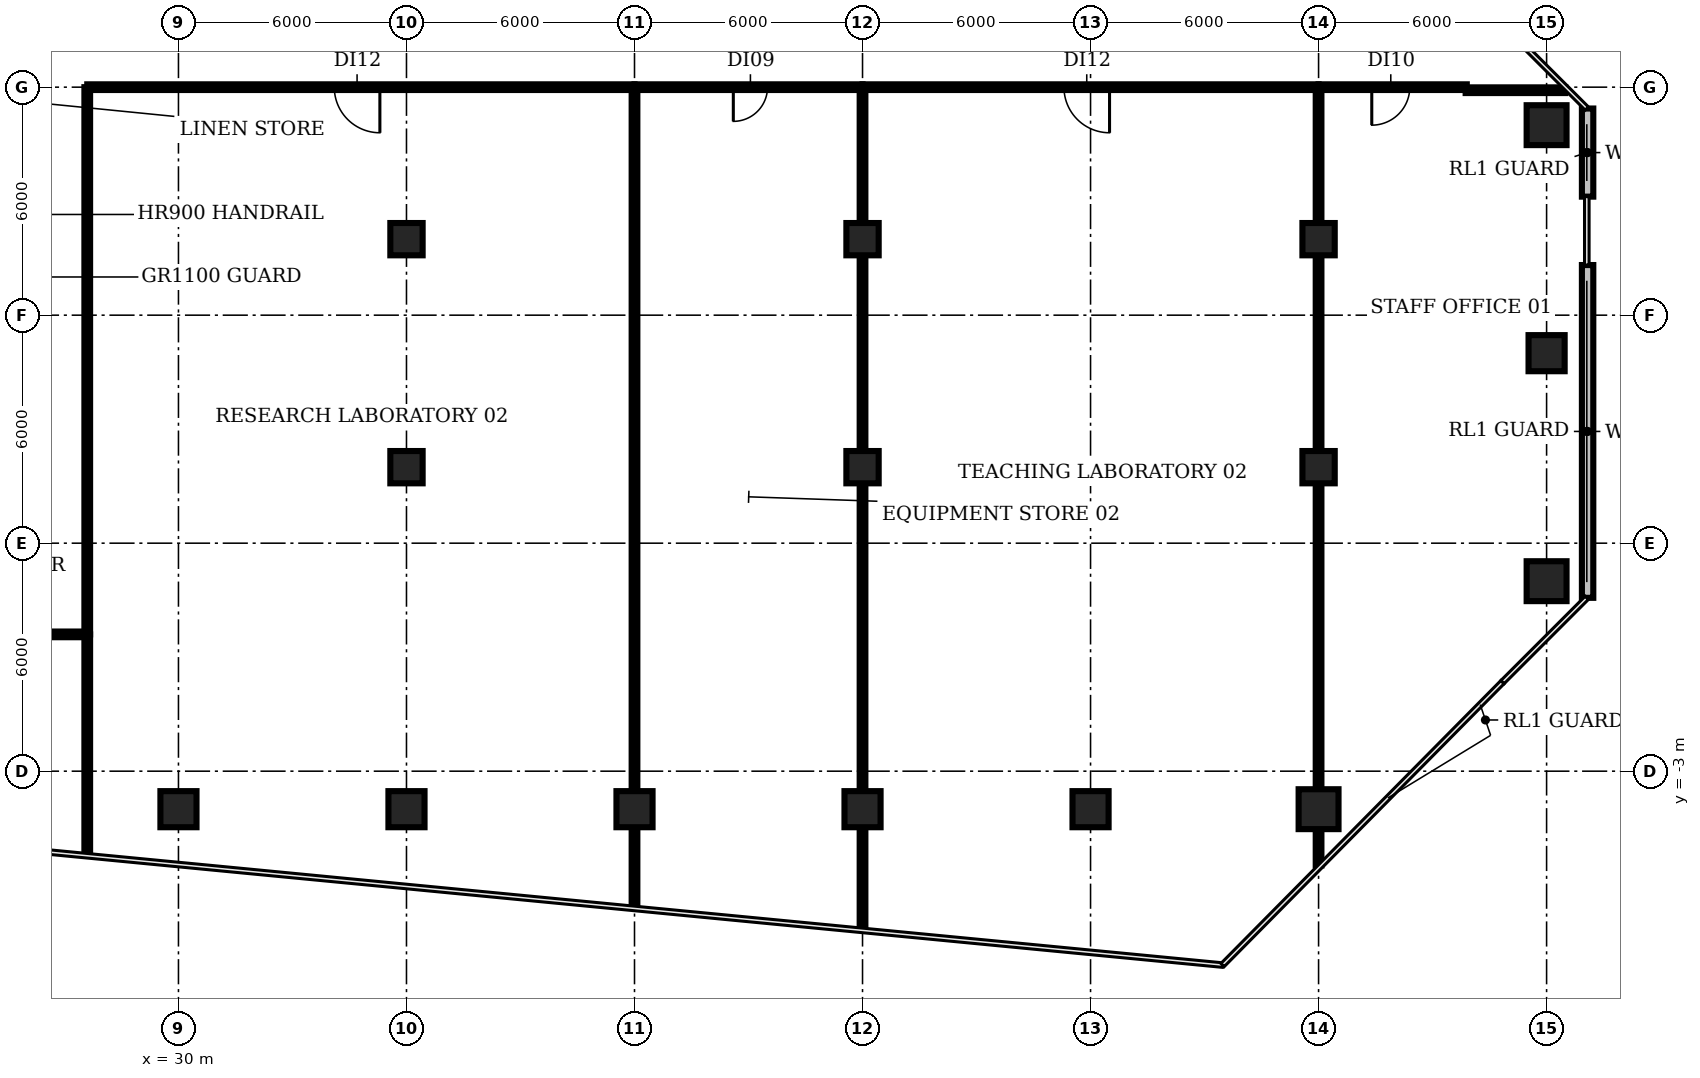
"""IFC4 building model, lengths in metres.
Left out: names, types, materials, properties, quantities, classifications, styles, units other than length and angle.
Written with IfcOpenShell. Run it as: python <this file> out.ifc"""

import sys

from ifc_helpers import new_model, si_unit, direction, frame, frame_2d, origin, origin_2d, place, context, subcontext, project, spatial, rectangle, circle, extrude, element, fill, save


model = new_model("IFC4")
c1 = context("Model", 3, precision=1e-05, world=origin(), true_north=direction((0.0, 1.0)))
c2 = subcontext(c1, "Body", "Model", "MODEL_VIEW")
j1 = project(units=[si_unit("LENGTHUNIT", "METRE"), si_unit("PLANEANGLEUNIT", "RADIAN")], contexts=[c1])
p1 = place(None, origin())
s1 = spatial("IfcSite", under=j1, at=p1, CompositionType="ELEMENT")
p2 = place(p1, origin())
s2 = spatial("IfcBuilding", under=s1, at=p2, CompositionType="ELEMENT")
p3 = place(p2, frame((0.0, 0.0, 29.0)))
s3 = spatial("IfcBuildingStorey", under=s2, at=p3, CompositionType="ELEMENT", Elevation=29.0)
for number, where, z_axis, x_axis in (
    (1, (30.0, -4.0, 0.0), (0.0, 0.0, 1.0), (1.0, 0.0, 0.0)),
    (2, (36.0, -4.0, 0.0), (0.0, 0.0, 1.0), (1.0, 0.0, 0.0)),
):
    element("IfcColumn", number, at=place(p3, frame(where, z_axis=z_axis, x_axis=x_axis)), inside=s3, PredefinedType="COLUMN", context=c2, shape_type="SweptSolid", body=[
        extrude(rectangle(XDim=0.95, YDim=0.95, at=origin_2d()), origin(), (0.0, 0.0, 1.0), 3.85),
    ])
for number, where, z_axis, x_axis in (
    (3, (36.0, 5.0, 0.0), (0.0, 0.0, 1.0), (1.0, 0.0, 0.0)),
    (4, (36.0, 11.0, 0.0), (0.0, 0.0, 1.0), (1.0, 0.0, 0.0)),
):
    element("IfcColumn", number, at=place(p3, frame(where, z_axis=z_axis, x_axis=x_axis)), inside=s3, PredefinedType="COLUMN", context=c2, shape_type="SweptSolid", body=[
        extrude(rectangle(XDim=0.85, YDim=0.85, at=origin_2d()), origin(), (0.0, 0.0, 1.0), 3.85),
    ])
for number, where, z_axis, x_axis in (
    (5, (42.0, -4.0, 0.0), (0.0, 0.0, 1.0), (1.0, 0.0, 0.0)),
    (6, (48.0, -4.0, 0.0), (0.0, 0.0, 1.0), (1.0, 0.0, 0.0)),
):
    element("IfcColumn", number, at=place(p3, frame(where, z_axis=z_axis, x_axis=x_axis)), inside=s3, PredefinedType="COLUMN", context=c2, shape_type="SweptSolid", body=[
        extrude(rectangle(XDim=0.95, YDim=0.95, at=origin_2d()), origin(), (0.0, 0.0, 1.0), 3.85),
    ])
for number, where, z_axis, x_axis in (
    (7, (48.0, 5.0, 0.0), (0.0, 0.0, 1.0), (1.0, 0.0, 0.0)),
    (8, (48.0, 11.0, 0.0), (0.0, 0.0, 1.0), (1.0, 0.0, 0.0)),
):
    element("IfcColumn", number, at=place(p3, frame(where, z_axis=z_axis, x_axis=x_axis)), inside=s3, PredefinedType="COLUMN", context=c2, shape_type="SweptSolid", body=[
        extrude(rectangle(XDim=0.85, YDim=0.85, at=origin_2d()), origin(), (0.0, 0.0, 1.0), 3.85),
    ])
p4 = place(p3, frame((54.0, -4.0, 0.0), z_axis=(0.0, 0.0, 1.0), x_axis=(1.0, 0.0, 0.0)))
e9 = element("IfcColumn", 9, at=p4, inside=s3, PredefinedType="COLUMN", context=c2, shape_type="SweptSolid", body=[
    extrude(rectangle(XDim=0.95, YDim=0.95, at=origin_2d()), origin(), (0.0, 0.0, 1.0), 3.85),
])
p5 = place(p3, frame((60.0, -4.0, 0.0), z_axis=(0.0, 0.0, 1.0), x_axis=(1.0, 0.0, 0.0)))
e10 = element("IfcColumn", 10, at=p5, inside=s3, PredefinedType="COLUMN", context=c2, shape_type="SweptSolid", body=[
    extrude(circle(Radius=0.525, at=origin_2d()), origin(), (0.0, 0.0, 1.0), 3.85),
])
for number, where, z_axis, x_axis in (
    (11, (60.0, 5.0, 0.0), (0.0, 0.0, 1.0), (1.0, 0.0, 0.0)),
    (12, (60.0, 11.0, 0.0), (0.0, 0.0, 1.0), (1.0, 0.0, 0.0)),
):
    element("IfcColumn", number, at=place(p3, frame(where, z_axis=z_axis, x_axis=x_axis)), inside=s3, PredefinedType="COLUMN", context=c2, shape_type="SweptSolid", body=[
        extrude(rectangle(XDim=0.85, YDim=0.85, at=origin_2d()), origin(), (0.0, 0.0, 1.0), 3.85),
    ])
p6 = place(p3, frame((66.0, 2.0, 0.0), z_axis=(0.0, 0.0, 1.0), x_axis=(1.0, 0.0, 0.0)))
e13 = element("IfcColumn", 13, at=p6, inside=s3, PredefinedType="COLUMN", context=c2, shape_type="SweptSolid", body=[
    extrude(circle(Radius=0.525, at=origin_2d()), origin(), (0.0, 0.0, 1.0), 3.85),
])
p7 = place(p3, frame((66.0, 8.0, 0.0), z_axis=(0.0, 0.0, 1.0), x_axis=(1.0, 0.0, 0.0)))
e14 = element("IfcColumn", 14, at=p7, inside=s3, PredefinedType="COLUMN", context=c2, shape_type="SweptSolid", body=[
    extrude(rectangle(XDim=0.95, YDim=0.95, at=origin_2d()), origin(), (0.0, 0.0, 1.0), 3.85),
])
p8 = place(p3, frame((66.0, 14.0, 0.0), z_axis=(0.0, 0.0, 1.0), x_axis=(1.0, 0.0, 0.0)))
e15 = element("IfcColumn", 15, at=p8, inside=s3, PredefinedType="COLUMN", context=c2, shape_type="SweptSolid", body=[
    extrude(circle(Radius=0.525, at=origin_2d()), origin(), (0.0, 0.0, 1.0), 3.85),
])
p9 = place(p3, frame((67.079, 1.562, 0.0), z_axis=(0.0, 0.0, 1.0), x_axis=(0.0, 1.0, 0.0)))
e16 = element("IfcWall", 16, at=p9, inside=s3, PredefinedType="SOLIDWALL", context=c2, shape_type="SweptSolid", body=[
    extrude(rectangle(XDim=8.757, YDim=0.3, at=frame_2d((4.379, 0.0))), origin(), (0.0, 0.0, 1.0), 3.85),
])
p10 = place(p3, frame((67.079, 12.119, 0.0), z_axis=(0.0, 0.0, 1.0), x_axis=(0.0, 1.0, 0.0)))
e17 = element("IfcWall", 17, at=p10, inside=s3, PredefinedType="SOLIDWALL", context=c2, shape_type="SweptSolid", body=[
    extrude(rectangle(XDim=2.319, YDim=0.3, at=frame_2d((1.16, 0.0))), origin(), (0.0, 0.0, 1.0), 3.85),
])
p11 = place(p3, frame((27.6, -5.18, 0.0), z_axis=(0.0, 0.0, 1.0), x_axis=(0.0, 1.0, 0.0)))
e18 = element("IfcWall", 18, at=p11, inside=s3, PredefinedType="PARTITIONING", context=c2, shape_type="SweptSolid", body=[
    extrude(rectangle(XDim=5.78, YDim=0.15, at=frame_2d((2.89, 0.0))), origin(), (0.0, 0.0, 1.0), 2.83),
])
p12 = place(p3, frame((27.6, 0.6, 0.0), z_axis=(0.0, 0.0, 1.0), x_axis=(-1.0, 0.0, 0.0)))
e19 = element("IfcWall", 19, at=p12, inside=s3, PredefinedType="PARTITIONING", context=c2, shape_type="SweptSolid", body=[
    extrude(rectangle(XDim=25.2, YDim=0.15, at=frame_2d((12.6, 0.0))), origin(), (0.0, 0.0, 1.0), 2.83),
])
p13 = place(p12, frame((12.1, 0.0, 0.0)))
e20 = element("IfcOpeningElement", 20, at=p13, cuts=e19, PredefinedType="OPENING", context=c2, shape_type="SweptSolid", body=[
    extrude(rectangle(XDim=1.2, YDim=2.1, at=frame_2d((0.6, 1.05))), frame((0.0, 0.085, 0.0), z_axis=(0.0, -1.0, 0.0), x_axis=(1.0, 0.0, 0.0)), (0.0, 0.0, 1.0), 0.17),
])
p14 = place(p3, frame((27.6, 0.6, 0.0), z_axis=(0.0, 0.0, 1.0), x_axis=(0.0, 1.0, 0.0)))
e21 = element("IfcWall", 21, at=p14, inside=s3, PredefinedType="PARTITIONING", context=c2, shape_type="SweptSolid", body=[
    extrude(rectangle(XDim=14.4, YDim=0.15, at=frame_2d((7.2, 0.0))), origin(), (0.0, 0.0, 1.0), 2.83),
])
p15 = place(p3, frame((42.0, -6.56, 0.0), z_axis=(0.0, 0.0, 1.0), x_axis=(0.0, 1.0, 0.0)))
e22 = element("IfcWall", 22, at=p15, inside=s3, PredefinedType="PARTITIONING", context=c2, shape_type="SweptSolid", body=[
    extrude(rectangle(XDim=21.56, YDim=0.15, at=frame_2d((10.78, 0.0))), origin(), (0.0, 0.0, 1.0), 2.83),
])
p16 = place(p3, frame((42.0, 15.0, 0.0), z_axis=(0.0, 0.0, 1.0), x_axis=(-1.0, 0.0, 0.0)))
e23 = element("IfcWall", 23, at=p16, inside=s3, PredefinedType="PARTITIONING", context=c2, shape_type="SweptSolid", body=[
    extrude(rectangle(XDim=14.4, YDim=0.15, at=frame_2d((7.2, 0.0))), origin(), (0.0, 0.0, 1.0), 2.83),
])
p17 = place(p16, frame((6.7, 0.0, 0.0)))
e24 = element("IfcOpeningElement", 24, at=p17, cuts=e23, PredefinedType="OPENING", context=c2, shape_type="SweptSolid", body=[
    extrude(rectangle(XDim=1.2, YDim=2.1, at=frame_2d((0.6, 1.05))), frame((0.0, 0.085, 0.0), z_axis=(0.0, -1.0, 0.0), x_axis=(1.0, 0.0, 0.0)), (0.0, 0.0, 1.0), 0.17),
])
p18 = place(p3, frame((48.0, -7.14, 0.0), z_axis=(0.0, 0.0, 1.0), x_axis=(0.0, 1.0, 0.0)))
e25 = element("IfcWall", 25, at=p18, inside=s3, PredefinedType="PARTITIONING", context=c2, shape_type="SweptSolid", body=[
    extrude(rectangle(XDim=22.14, YDim=0.15, at=frame_2d((11.07, 0.0))), origin(), (0.0, 0.0, 1.0), 2.83),
])
p19 = place(p3, frame((48.0, 15.0, 0.0), z_axis=(0.0, 0.0, 1.0), x_axis=(-1.0, 0.0, 0.0)))
e26 = element("IfcWall", 26, at=p19, inside=s3, PredefinedType="PARTITIONING", context=c2, shape_type="SweptSolid", body=[
    extrude(rectangle(XDim=6.0, YDim=0.15, at=frame_2d((3.0, 0.0))), origin(), (0.0, 0.0, 1.0), 2.83),
])
p20 = place(p19, frame((2.5, 0.0, 0.0)))
e27 = element("IfcOpeningElement", 27, at=p20, cuts=e26, PredefinedType="OPENING", context=c2, shape_type="SweptSolid", body=[
    extrude(rectangle(XDim=0.9, YDim=2.1, at=frame_2d((0.45, 1.05))), frame((0.0, 0.085, 0.0), z_axis=(0.0, -1.0, 0.0), x_axis=(1.0, 0.0, 0.0)), (0.0, 0.0, 1.0), 0.17),
])
p21 = place(p3, frame((60.0, -5.48, 0.0), z_axis=(0.0, 0.0, 1.0), x_axis=(0.0, 1.0, 0.0)))
e28 = element("IfcWall", 28, at=p21, inside=s3, PredefinedType="PARTITIONING", context=c2, shape_type="SweptSolid", body=[
    extrude(rectangle(XDim=20.48, YDim=0.15, at=frame_2d((10.24, 0.0))), origin(), (0.0, 0.0, 1.0), 2.83),
])
p22 = place(p3, frame((60.0, 15.0, 0.0), z_axis=(0.0, 0.0, 1.0), x_axis=(-1.0, 0.0, 0.0)))
e29 = element("IfcWall", 29, at=p22, inside=s3, PredefinedType="PARTITIONING", context=c2, shape_type="SweptSolid", body=[
    extrude(rectangle(XDim=12.0, YDim=0.15, at=frame_2d((6.0, 0.0))), origin(), (0.0, 0.0, 1.0), 2.83),
])
p23 = place(p22, frame((5.5, 0.0, 0.0)))
e30 = element("IfcOpeningElement", 30, at=p23, cuts=e29, PredefinedType="OPENING", context=c2, shape_type="SweptSolid", body=[
    extrude(rectangle(XDim=1.2, YDim=2.1, at=frame_2d((0.6, 1.05))), frame((0.0, 0.085, 0.0), z_axis=(0.0, -1.0, 0.0), x_axis=(1.0, 0.0, 0.0)), (0.0, 0.0, 1.0), 0.17),
])
p24 = place(p3, frame((63.87, 14.92, 0.0), z_axis=(0.0, 0.0, 1.0), x_axis=(1.0, 0.0, 0.0)))
e31 = element("IfcWall", 31, at=p24, inside=s3, PredefinedType="PARTITIONING", context=c2, shape_type="SweptSolid", body=[
    extrude(rectangle(XDim=2.621, YDim=0.15, at=frame_2d((1.311, 0.0))), origin(), (0.0, 0.0, 1.0), 2.83),
])
p25 = place(p3, frame((63.9, 15.0, 0.0), z_axis=(0.0, 0.0, 1.0), x_axis=(-1.0, 0.0, 0.0)))
e32 = element("IfcWall", 32, at=p25, inside=s3, PredefinedType="PARTITIONING", context=c2, shape_type="SweptSolid", body=[
    extrude(rectangle(XDim=3.9, YDim=0.15, at=frame_2d((1.95, 0.0))), origin(), (0.0, 0.0, 1.0), 2.83),
])
p26 = place(p25, frame((1.5, 0.0, 0.0)))
e33 = element("IfcOpeningElement", 33, at=p26, cuts=e32, PredefinedType="OPENING", context=c2, shape_type="SweptSolid", body=[
    extrude(rectangle(XDim=1.0, YDim=2.1, at=frame_2d((0.5, 1.05))), frame((0.0, 0.085, 0.0), z_axis=(0.0, -1.0, 0.0), x_axis=(1.0, 0.0, 0.0)), (0.0, 0.0, 1.0), 0.17),
])
p27 = place(p17, origin())
e34 = element("IfcDoor", 34, at=p27, inside=s3, OperationType="SINGLE_SWING_LEFT", PredefinedType="DOOR", context=c2, shape_type="SweptSolid", body=[
    extrude(rectangle(XDim=1.2, YDim=2.1, at=frame_2d((0.6, 1.05))), frame((0.0, 0.025, 0.0), z_axis=(0.0, -1.0, 0.0), x_axis=(1.0, 0.0, 0.0)), (0.0, 0.0, 1.0), 0.05),
])
fill(e24, e34)
p28 = place(p20, origin())
e35 = element("IfcDoor", 35, at=p28, inside=s3, OperationType="SINGLE_SWING_RIGHT", PredefinedType="DOOR", context=c2, shape_type="SweptSolid", body=[
    extrude(rectangle(XDim=0.9, YDim=2.1, at=frame_2d((0.45, 1.05))), frame((0.0, 0.025, 0.0), z_axis=(0.0, -1.0, 0.0), x_axis=(1.0, 0.0, 0.0)), (0.0, 0.0, 1.0), 0.05),
])
fill(e27, e35)
p29 = place(p23, origin())
e36 = element("IfcDoor", 36, at=p29, inside=s3, OperationType="SINGLE_SWING_LEFT", PredefinedType="DOOR", context=c2, shape_type="SweptSolid", body=[
    extrude(rectangle(XDim=1.2, YDim=2.1, at=frame_2d((0.6, 1.05))), frame((0.0, 0.025, 0.0), z_axis=(0.0, -1.0, 0.0), x_axis=(1.0, 0.0, 0.0)), (0.0, 0.0, 1.0), 0.05),
])
fill(e30, e36)
p30 = place(p26, origin())
e37 = element("IfcDoor", 37, at=p30, inside=s3, OperationType="SINGLE_SWING_RIGHT", PredefinedType="DOOR", context=c2, shape_type="SweptSolid", body=[
    extrude(rectangle(XDim=1.0, YDim=2.1, at=frame_2d((0.5, 1.05))), frame((0.0, 0.025, 0.0), z_axis=(0.0, -1.0, 0.0), x_axis=(1.0, 0.0, 0.0)), (0.0, 0.0, 1.0), 0.05),
])
fill(e33, e37)
save(model, sys.argv[1])
